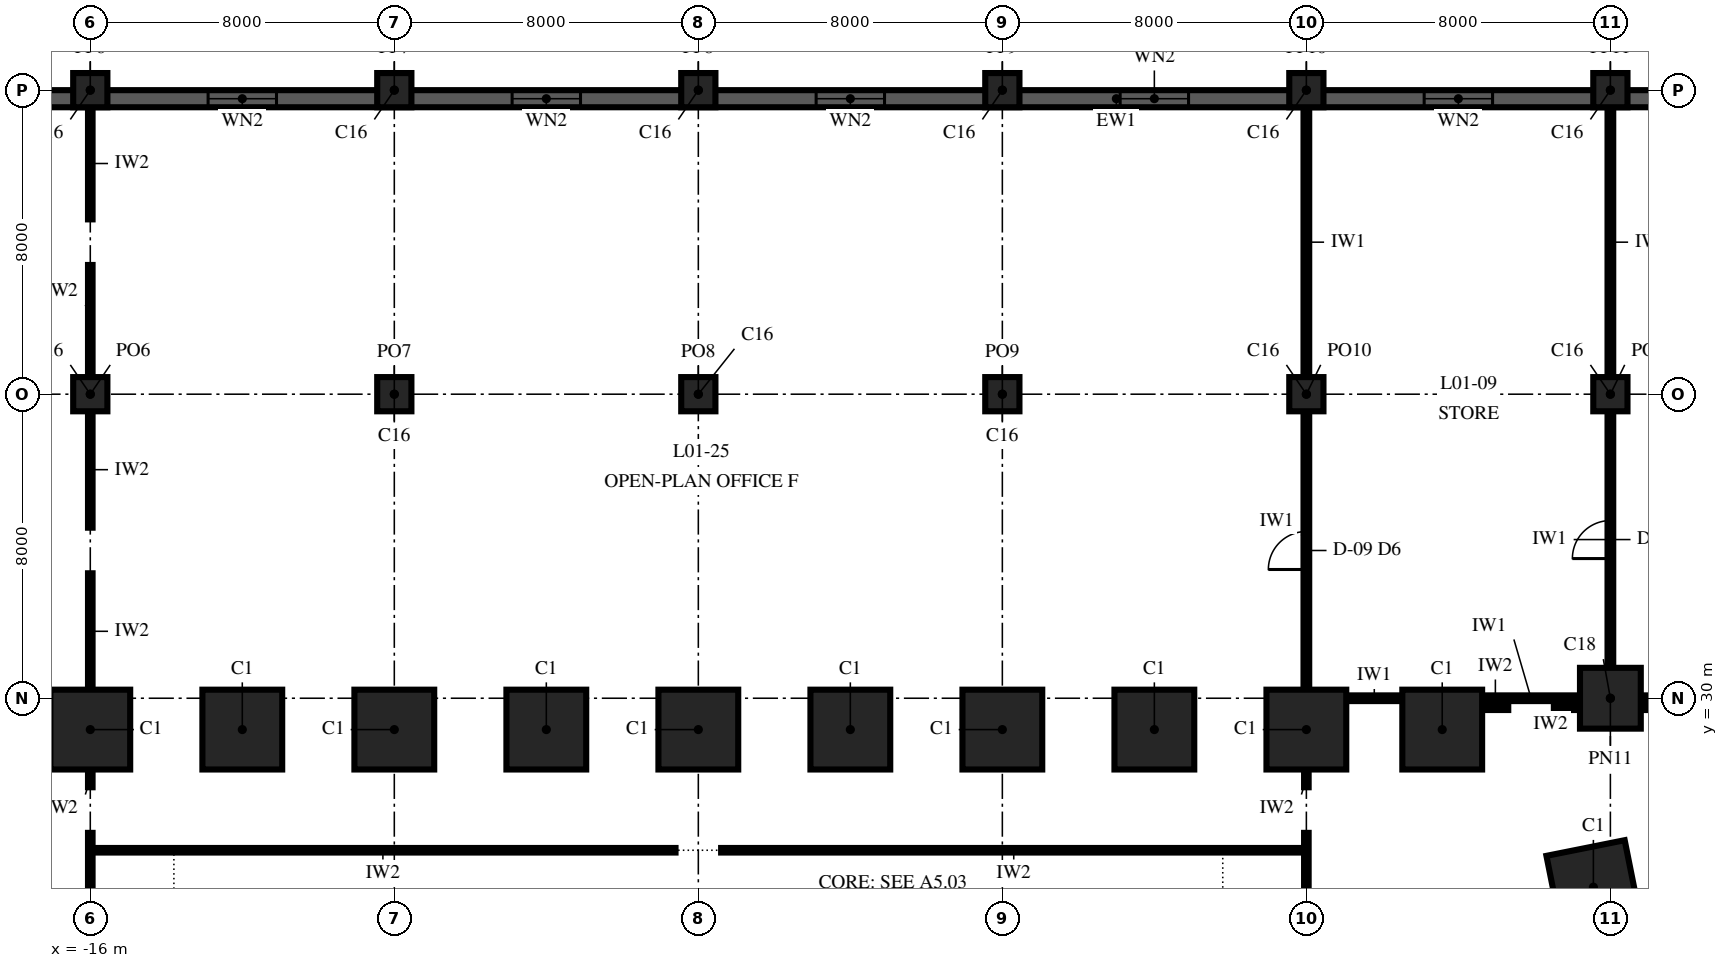
"""IFC4 building model, lengths in metres.
Left out: names, types, materials, properties, quantities, classifications, styles, units other than length and angle.
Written with IfcOpenShell. Run it as: python <this file> out.ifc"""

import sys

from ifc_helpers import new_model, si_unit, direction, frame, frame_2d, origin, origin_2d, place, context, subcontext, project, spatial, rectangle, extrude, element, fill, save


model = new_model("IFC4")
c1 = context("Model", 3, precision=1e-05, world=origin(), true_north=direction((0.0, 1.0)))
c2 = subcontext(c1, "Body", "Model", "MODEL_VIEW")
j1 = project(units=[si_unit("LENGTHUNIT", "METRE"), si_unit("PLANEANGLEUNIT", "RADIAN")], contexts=[c1])
p1 = place(None, origin())
s1 = spatial("IfcSite", under=j1, at=p1, CompositionType="ELEMENT")
p2 = place(p1, origin())
s2 = spatial("IfcBuilding", under=s1, at=p2, CompositionType="ELEMENT")
p3 = place(p2, frame((0.0, 0.0, 6.0)))
s3 = spatial("IfcBuildingStorey", under=s2, at=p3, CompositionType="ELEMENT", Elevation=6.0)
for number, where, z_axis, x_axis in (
    (1, (23.553, 25.029, 0.0), (0.0, 0.0, 1.0), (-0.196, 0.981, 0.0)),
    (2, (19.575, 29.175, 0.0), (0.0, 0.0, 1.0), (-1.0, 0.0, 0.0)),
    (3, (16.0, 29.175, 0.0), (0.0, 0.0, 1.0), (-1.0, 0.0, 0.0)),
    (4, (12.0, 29.175, 0.0), (0.0, 0.0, 1.0), (-1.0, 0.0, 0.0)),
    (5, (8.0, 29.175, 0.0), (0.0, 0.0, 1.0), (-1.0, 0.0, 0.0)),
    (6, (4.0, 29.175, 0.0), (0.0, 0.0, 1.0), (-1.0, 0.0, 0.0)),
    (7, (0.0, 29.175, 0.0), (0.0, 0.0, 1.0), (-1.0, 0.0, 0.0)),
    (8, (-4.0, 29.175, 0.0), (0.0, 0.0, 1.0), (-1.0, 0.0, 0.0)),
    (9, (-8.0, 29.175, 0.0), (0.0, 0.0, 1.0), (-1.0, 0.0, 0.0)),
    (10, (-12.0, 29.175, 0.0), (0.0, 0.0, 1.0), (-1.0, 0.0, 0.0)),
    (11, (-16.0, 29.175, 0.0), (0.0, 0.0, 1.0), (-1.0, 0.0, 0.0)),
):
    element("IfcColumn", number, at=place(p3, frame(where, z_axis=z_axis, x_axis=x_axis)), inside=s3, PredefinedType="COLUMN", context=c2, shape_type="SweptSolid", body=[
        extrude(rectangle(XDim=2.1, YDim=2.1, at=origin_2d()), origin(), (0.0, 0.0, 1.0), 6.0),
    ])
for number, where, z_axis, x_axis in (
    (12, (-16.0, 38.0, 0.0), (0.0, 0.0, 1.0), (1.0, 0.0, 0.0)),
    (13, (-16.0, 46.0, 0.0), (0.0, 0.0, 1.0), (1.0, 0.0, 0.0)),
    (14, (-8.0, 38.0, 0.0), (0.0, 0.0, 1.0), (1.0, 0.0, 0.0)),
    (15, (-8.0, 46.0, 0.0), (0.0, 0.0, 1.0), (1.0, 0.0, 0.0)),
    (16, (0.0, 38.0, 0.0), (0.0, 0.0, 1.0), (1.0, 0.0, 0.0)),
    (17, (0.0, 46.0, 0.0), (0.0, 0.0, 1.0), (1.0, 0.0, 0.0)),
    (18, (8.0, 38.0, 0.0), (0.0, 0.0, 1.0), (1.0, 0.0, 0.0)),
    (19, (8.0, 46.0, 0.0), (0.0, 0.0, 1.0), (1.0, 0.0, 0.0)),
    (20, (16.0, 38.0, 0.0), (0.0, 0.0, 1.0), (1.0, 0.0, 0.0)),
    (21, (16.0, 46.0, 0.0), (0.0, 0.0, 1.0), (1.0, 0.0, 0.0)),
):
    element("IfcColumn", number, at=place(p3, frame(where, z_axis=z_axis, x_axis=x_axis)), inside=s3, PredefinedType="COLUMN", context=c2, shape_type="SweptSolid", body=[
        extrude(rectangle(XDim=0.9, YDim=0.9, at=origin_2d()), origin(), (0.0, 0.0, 1.0), 6.0),
    ])
p4 = place(p3, frame((24.0, 30.0, 0.0), z_axis=(0.0, 0.0, 1.0), x_axis=(1.0, 0.0, 0.0)))
e22 = element("IfcColumn", 22, at=p4, inside=s3, PredefinedType="COLUMN", context=c2, shape_type="SweptSolid", body=[
    extrude(rectangle(XDim=1.6, YDim=1.6, at=origin_2d()), origin(), (0.0, 0.0, 1.0), 6.0),
])
for number, where, z_axis, x_axis in (
    (23, (24.0, 38.0, 0.0), (0.0, 0.0, 1.0), (1.0, 0.0, 0.0)),
    (24, (24.0, 46.0, 0.0), (0.0, 0.0, 1.0), (1.0, 0.0, 0.0)),
):
    element("IfcColumn", number, at=place(p3, frame(where, z_axis=z_axis, x_axis=x_axis)), inside=s3, PredefinedType="COLUMN", context=c2, shape_type="SweptSolid", body=[
        extrude(rectangle(XDim=0.9, YDim=0.9, at=origin_2d()), origin(), (0.0, 0.0, 1.0), 6.0),
    ])
p5 = place(p3, frame((56.0, 45.775, 0.0), z_axis=(0.0, 0.0, 1.0), x_axis=(-1.0, 0.0, 0.0)))
e25 = element("IfcWall", 25, at=p5, inside=s3, PredefinedType="SOLIDWALL", context=c2, shape_type="SweptSolid", body=[
    extrude(rectangle(XDim=90.0, YDim=0.45, at=frame_2d((45.0, 0.0))), origin(), (0.0, 0.0, 1.0), 6.0),
])
p6 = place(p5, frame((3.1, 0.0, 1.0)))
e26 = element("IfcOpeningElement", 26, at=p6, cuts=e25, PredefinedType="OPENING", context=c2, shape_type="SweptSolid", body=[
    extrude(rectangle(XDim=1.8, YDim=3.0, at=frame_2d((0.9, 1.5))), frame((0.0, 0.24, 0.0), z_axis=(0.0, -1.0, 0.0), x_axis=(1.0, 0.0, 0.0)), (0.0, 0.0, 1.0), 0.48),
])
p7 = place(p5, frame((11.1, 0.0, 1.0)))
e27 = element("IfcOpeningElement", 27, at=p7, cuts=e25, PredefinedType="OPENING", context=c2, shape_type="SweptSolid", body=[
    extrude(rectangle(XDim=1.8, YDim=3.0, at=frame_2d((0.9, 1.5))), frame((0.0, 0.24, 0.0), z_axis=(0.0, -1.0, 0.0), x_axis=(1.0, 0.0, 0.0)), (0.0, 0.0, 1.0), 0.48),
])
p8 = place(p5, frame((19.1, 0.0, 1.0)))
e28 = element("IfcOpeningElement", 28, at=p8, cuts=e25, PredefinedType="OPENING", context=c2, shape_type="SweptSolid", body=[
    extrude(rectangle(XDim=1.8, YDim=3.0, at=frame_2d((0.9, 1.5))), frame((0.0, 0.24, 0.0), z_axis=(0.0, -1.0, 0.0), x_axis=(1.0, 0.0, 0.0)), (0.0, 0.0, 1.0), 0.48),
])
p9 = place(p5, frame((27.1, 0.0, 1.0)))
e29 = element("IfcOpeningElement", 29, at=p9, cuts=e25, PredefinedType="OPENING", context=c2, shape_type="SweptSolid", body=[
    extrude(rectangle(XDim=1.8, YDim=3.0, at=frame_2d((0.9, 1.5))), frame((0.0, 0.24, 0.0), z_axis=(0.0, -1.0, 0.0), x_axis=(1.0, 0.0, 0.0)), (0.0, 0.0, 1.0), 0.48),
])
p10 = place(p5, frame((35.1, 0.0, 1.0)))
e30 = element("IfcOpeningElement", 30, at=p10, cuts=e25, PredefinedType="OPENING", context=c2, shape_type="SweptSolid", body=[
    extrude(rectangle(XDim=1.8, YDim=3.0, at=frame_2d((0.9, 1.5))), frame((0.0, 0.24, 0.0), z_axis=(0.0, -1.0, 0.0), x_axis=(1.0, 0.0, 0.0)), (0.0, 0.0, 1.0), 0.48),
])
p11 = place(p5, frame((43.1, 0.0, 1.0)))
e31 = element("IfcOpeningElement", 31, at=p11, cuts=e25, PredefinedType="OPENING", context=c2, shape_type="SweptSolid", body=[
    extrude(rectangle(XDim=1.8, YDim=3.0, at=frame_2d((0.9, 1.5))), frame((0.0, 0.24, 0.0), z_axis=(0.0, -1.0, 0.0), x_axis=(1.0, 0.0, 0.0)), (0.0, 0.0, 1.0), 0.48),
])
p12 = place(p5, frame((51.1, 0.0, 1.0)))
e32 = element("IfcOpeningElement", 32, at=p12, cuts=e25, PredefinedType="OPENING", context=c2, shape_type="SweptSolid", body=[
    extrude(rectangle(XDim=1.8, YDim=3.0, at=frame_2d((0.9, 1.5))), frame((0.0, 0.24, 0.0), z_axis=(0.0, -1.0, 0.0), x_axis=(1.0, 0.0, 0.0)), (0.0, 0.0, 1.0), 0.48),
])
p13 = place(p5, frame((59.1, 0.0, 1.0)))
e33 = element("IfcOpeningElement", 33, at=p13, cuts=e25, PredefinedType="OPENING", context=c2, shape_type="SweptSolid", body=[
    extrude(rectangle(XDim=1.8, YDim=3.0, at=frame_2d((0.9, 1.5))), frame((0.0, 0.24, 0.0), z_axis=(0.0, -1.0, 0.0), x_axis=(1.0, 0.0, 0.0)), (0.0, 0.0, 1.0), 0.48),
])
p14 = place(p5, frame((67.1, 0.0, 1.0)))
e34 = element("IfcOpeningElement", 34, at=p14, cuts=e25, PredefinedType="OPENING", context=c2, shape_type="SweptSolid", body=[
    extrude(rectangle(XDim=1.8, YDim=3.0, at=frame_2d((0.9, 1.5))), frame((0.0, 0.24, 0.0), z_axis=(0.0, -1.0, 0.0), x_axis=(1.0, 0.0, 0.0)), (0.0, 0.0, 1.0), 0.48),
])
p15 = place(p5, frame((75.1, 0.0, 1.0)))
e35 = element("IfcOpeningElement", 35, at=p15, cuts=e25, PredefinedType="OPENING", context=c2, shape_type="SweptSolid", body=[
    extrude(rectangle(XDim=1.8, YDim=3.0, at=frame_2d((0.9, 1.5))), frame((0.0, 0.24, 0.0), z_axis=(0.0, -1.0, 0.0), x_axis=(1.0, 0.0, 0.0)), (0.0, 0.0, 1.0), 0.48),
])
p16 = place(p5, frame((83.1, 0.0, 1.0)))
e36 = element("IfcOpeningElement", 36, at=p16, cuts=e25, PredefinedType="OPENING", context=c2, shape_type="SweptSolid", body=[
    extrude(rectangle(XDim=1.8, YDim=3.0, at=frame_2d((0.9, 1.5))), frame((0.0, 0.24, 0.0), z_axis=(0.0, -1.0, 0.0), x_axis=(1.0, 0.0, 0.0)), (0.0, 0.0, 1.0), 0.48),
])
p17 = place(p3, frame((-16.0, 22.46, 0.0), z_axis=(0.0, 0.0, 1.0), x_axis=(0.0, 1.0, 0.0)))
e37 = element("IfcWall", 37, at=p17, inside=s3, PredefinedType="PARTITIONING", context=c2, shape_type="SweptSolid", body=[
    extrude(rectangle(XDim=3.998, YDim=0.12, at=frame_2d((1.999, 0.0))), origin(), (0.0, 0.0, 1.0), 5.7),
])
p18 = place(p3, frame((-16.0, 27.657, 0.0), z_axis=(0.0, 0.0, 1.0), x_axis=(0.0, 1.0, 0.0)))
e38 = element("IfcWall", 38, at=p18, inside=s3, PredefinedType="PARTITIONING", context=c2, shape_type="SweptSolid", body=[
    extrude(rectangle(XDim=0.458, YDim=0.12, at=frame_2d((0.229, 0.0))), origin(), (0.0, 0.0, 1.0), 5.7),
])
for number, where, z_axis, x_axis in (
    (39, (-16.0, 30.235, 0.0), (0.0, 0.0, 1.0), (0.0, 1.0, 0.0)),
    (40, (-16.0, 34.488, 0.0), (0.0, 0.0, 1.0), (0.0, 1.0, 0.0)),
):
    element("IfcWall", number, at=place(p3, frame(where, z_axis=z_axis, x_axis=x_axis)), inside=s3, PredefinedType="PARTITIONING", context=c2, shape_type="SweptSolid", body=[
        extrude(rectangle(XDim=3.052, YDim=0.12, at=frame_2d((1.526, 0.0))), origin(), (0.0, 0.0, 1.0), 5.7),
    ])
for number, where, z_axis, x_axis in (
    (41, (-16.0, 38.46, 0.0), (0.0, 0.0, 1.0), (0.0, 1.0, 0.0)),
    (42, (-16.0, 42.6, 0.0), (0.0, 0.0, 1.0), (0.0, 1.0, 0.0)),
):
    element("IfcWall", number, at=place(p3, frame(where, z_axis=z_axis, x_axis=x_axis)), inside=s3, PredefinedType="PARTITIONING", context=c2, shape_type="SweptSolid", body=[
        extrude(rectangle(XDim=2.94, YDim=0.12, at=frame_2d((1.47, 0.0))), origin(), (0.0, 0.0, 1.0), 5.05),
    ])
p19 = place(p3, frame((16.0, 22.46, 0.0), z_axis=(0.0, 0.0, 1.0), x_axis=(0.0, 1.0, 0.0)))
e43 = element("IfcWall", 43, at=p19, inside=s3, PredefinedType="PARTITIONING", context=c2, shape_type="SweptSolid", body=[
    extrude(rectangle(XDim=3.998, YDim=0.12, at=frame_2d((1.999, 0.0))), origin(), (0.0, 0.0, 1.0), 5.7),
])
p20 = place(p3, frame((16.0, 27.657, 0.0), z_axis=(0.0, 0.0, 1.0), x_axis=(0.0, 1.0, 0.0)))
e44 = element("IfcWall", 44, at=p20, inside=s3, PredefinedType="PARTITIONING", context=c2, shape_type="SweptSolid", body=[
    extrude(rectangle(XDim=0.458, YDim=0.12, at=frame_2d((0.229, 0.0))), origin(), (0.0, 0.0, 1.0), 5.7),
])
p21 = place(p3, frame((16.0, 30.235, 0.0), z_axis=(0.0, 0.0, 1.0), x_axis=(0.0, 1.0, 0.0)))
e45 = element("IfcWall", 45, at=p21, inside=s3, PredefinedType="PARTITIONING", context=c2, shape_type="SweptSolid", body=[
    extrude(rectangle(XDim=7.305, YDim=0.15, at=frame_2d((3.652, 0.0))), origin(), (0.0, 0.0, 1.0), 5.7),
])
p22 = place(p21, frame((3.153, 0.0, 0.0)))
e46 = element("IfcOpeningElement", 46, at=p22, cuts=e45, PredefinedType="OPENING", context=c2, shape_type="SweptSolid", body=[
    extrude(rectangle(XDim=1.0, YDim=2.1, at=frame_2d((0.5, 1.05))), frame((0.0, 0.09, 0.0), z_axis=(0.0, -1.0, 0.0), x_axis=(1.0, 0.0, 0.0)), (0.0, 0.0, 1.0), 0.18),
])
p23 = place(p3, frame((16.0, 38.46, 0.0), z_axis=(0.0, 0.0, 1.0), x_axis=(0.0, 1.0, 0.0)))
e47 = element("IfcWall", 47, at=p23, inside=s3, PredefinedType="PARTITIONING", context=c2, shape_type="SweptSolid", body=[
    extrude(rectangle(XDim=7.08, YDim=0.15, at=frame_2d((3.54, 0.0))), origin(), (0.0, 0.0, 1.0), 5.05),
])
p24 = place(p3, frame((24.0, 30.81, 0.0), z_axis=(0.0, 0.0, 1.0), x_axis=(0.0, 1.0, 0.0)))
e48 = element("IfcWall", 48, at=p24, inside=s3, PredefinedType="PARTITIONING", context=c2, shape_type="SweptSolid", body=[
    extrude(rectangle(XDim=6.73, YDim=0.15, at=frame_2d((3.365, 0.0))), origin(), (0.0, 0.0, 1.0), 5.05),
])
p25 = place(p24, frame((2.865, 0.0, 0.0)))
e49 = element("IfcOpeningElement", 49, at=p25, cuts=e48, PredefinedType="OPENING", context=c2, shape_type="SweptSolid", body=[
    extrude(rectangle(XDim=1.0, YDim=2.1, at=frame_2d((0.5, 1.05))), frame((0.0, 0.09, 0.0), z_axis=(0.0, -1.0, 0.0), x_axis=(1.0, 0.0, 0.0)), (0.0, 0.0, 1.0), 0.18),
])
p26 = place(p3, frame((24.0, 38.46, 0.0), z_axis=(0.0, 0.0, 1.0), x_axis=(0.0, 1.0, 0.0)))
e50 = element("IfcWall", 50, at=p26, inside=s3, PredefinedType="PARTITIONING", context=c2, shape_type="SweptSolid", body=[
    extrude(rectangle(XDim=7.08, YDim=0.15, at=frame_2d((3.54, 0.0))), origin(), (0.0, 0.0, 1.0), 5.05),
])
for number, where, z_axis, x_axis in (
    (51, (-16.0, 26.0, 0.0), (0.0, 0.0, 1.0), (1.0, 0.0, 0.0)),
    (52, (0.6, 26.0, 0.0), (0.0, 0.0, 1.0), (1.0, 0.0, 0.0)),
):
    element("IfcWall", number, at=place(p3, frame(where, z_axis=z_axis, x_axis=x_axis)), inside=s3, PredefinedType="PARTITIONING", context=c2, shape_type="SweptSolid", body=[
        extrude(rectangle(XDim=15.4, YDim=0.12, at=frame_2d((7.7, 0.0))), origin(), (0.0, 0.0, 1.0), 5.7),
    ])
for number, where, z_axis, x_axis in (
    (53, (20.635, 29.75, 0.0), (0.0, 0.0, 1.0), (1.0, 0.0, 0.0)),
    (54, (22.512, 29.75, 0.0), (0.0, 0.0, 1.0), (1.0, 0.0, 0.0)),
):
    element("IfcWall", number, at=place(p3, frame(where, z_axis=z_axis, x_axis=x_axis)), inside=s3, PredefinedType="PARTITIONING", context=c2, shape_type="SweptSolid", body=[
        extrude(rectangle(XDim=0.677, YDim=0.12, at=frame_2d((0.339, 0.0))), origin(), (0.0, 0.0, 1.0), 5.7),
    ])
p27 = place(p3, frame((24.81, 29.75, 0.0), z_axis=(0.0, 0.0, 1.0), x_axis=(1.0, 0.0, 0.0)))
e55 = element("IfcWall", 55, at=p27, inside=s3, PredefinedType="PARTITIONING", context=c2, shape_type="SweptSolid", body=[
    extrude(rectangle(XDim=2.765, YDim=0.12, at=frame_2d((1.382, 0.0))), origin(), (0.0, 0.0, 1.0), 5.05),
])
p28 = place(p3, frame((17.06, 30.0, 0.0), z_axis=(0.0, 0.0, 1.0), x_axis=(1.0, 0.0, 0.0)))
e56 = element("IfcWall", 56, at=p28, inside=s3, PredefinedType="PARTITIONING", context=c2, shape_type="SweptSolid", body=[
    extrude(rectangle(XDim=1.455, YDim=0.15, at=frame_2d((0.728, 0.0))), origin(), (0.0, 0.0, 1.0), 5.7),
])
p29 = place(p3, frame((20.635, 30.0, 0.0), z_axis=(0.0, 0.0, 1.0), x_axis=(1.0, 0.0, 0.0)))
e57 = element("IfcWall", 57, at=p29, inside=s3, PredefinedType="PARTITIONING", context=c2, shape_type="SweptSolid", body=[
    extrude(rectangle(XDim=2.555, YDim=0.15, at=frame_2d((1.277, 0.0))), origin(), (0.0, 0.0, 1.0), 5.7),
])
p30 = place(p3, frame((24.81, 30.0, 0.0), z_axis=(0.0, 0.0, 1.0), x_axis=(1.0, 0.0, 0.0)))
e58 = element("IfcWall", 58, at=p30, inside=s3, PredefinedType="PARTITIONING", context=c2, shape_type="SweptSolid", body=[
    extrude(rectangle(XDim=6.73, YDim=0.15, at=frame_2d((3.365, 0.0))), origin(), (0.0, 0.0, 1.0), 5.05),
])
p31 = place(p10, origin())
e59 = element("IfcWindow", 59, at=p31, inside=s3, PartitioningType="SINGLE_PANEL", PredefinedType="WINDOW", context=c2, shape_type="SweptSolid", body=[
    extrude(rectangle(XDim=1.8, YDim=3.0, at=frame_2d((0.9, 1.5))), frame((0.0, 0.03, 0.0), z_axis=(0.0, -1.0, 0.0), x_axis=(1.0, 0.0, 0.0)), (0.0, 0.0, 1.0), 0.06),
])
fill(e30, e59)
p32 = place(p11, origin())
e60 = element("IfcWindow", 60, at=p32, inside=s3, PartitioningType="SINGLE_PANEL", PredefinedType="WINDOW", context=c2, shape_type="SweptSolid", body=[
    extrude(rectangle(XDim=1.8, YDim=3.0, at=frame_2d((0.9, 1.5))), frame((0.0, 0.03, 0.0), z_axis=(0.0, -1.0, 0.0), x_axis=(1.0, 0.0, 0.0)), (0.0, 0.0, 1.0), 0.06),
])
fill(e31, e60)
p33 = place(p12, origin())
e61 = element("IfcWindow", 61, at=p33, inside=s3, PartitioningType="SINGLE_PANEL", PredefinedType="WINDOW", context=c2, shape_type="SweptSolid", body=[
    extrude(rectangle(XDim=1.8, YDim=3.0, at=frame_2d((0.9, 1.5))), frame((0.0, 0.03, 0.0), z_axis=(0.0, -1.0, 0.0), x_axis=(1.0, 0.0, 0.0)), (0.0, 0.0, 1.0), 0.06),
])
fill(e32, e61)
p34 = place(p13, origin())
e62 = element("IfcWindow", 62, at=p34, inside=s3, PartitioningType="SINGLE_PANEL", PredefinedType="WINDOW", context=c2, shape_type="SweptSolid", body=[
    extrude(rectangle(XDim=1.8, YDim=3.0, at=frame_2d((0.9, 1.5))), frame((0.0, 0.03, 0.0), z_axis=(0.0, -1.0, 0.0), x_axis=(1.0, 0.0, 0.0)), (0.0, 0.0, 1.0), 0.06),
])
fill(e33, e62)
p35 = place(p14, origin())
e63 = element("IfcWindow", 63, at=p35, inside=s3, PartitioningType="SINGLE_PANEL", PredefinedType="WINDOW", context=c2, shape_type="SweptSolid", body=[
    extrude(rectangle(XDim=1.8, YDim=3.0, at=frame_2d((0.9, 1.5))), frame((0.0, 0.03, 0.0), z_axis=(0.0, -1.0, 0.0), x_axis=(1.0, 0.0, 0.0)), (0.0, 0.0, 1.0), 0.06),
])
fill(e34, e63)
p36 = place(p22, origin())
e64 = element("IfcDoor", 64, at=p36, inside=s3, OperationType="SINGLE_SWING_LEFT", PredefinedType="DOOR", context=c2, shape_type="SweptSolid", body=[
    extrude(rectangle(XDim=1.0, YDim=2.1, at=frame_2d((0.5, 1.05))), frame((0.0, 0.075, 0.0), z_axis=(0.0, -1.0, 0.0), x_axis=(1.0, 0.0, 0.0)), (0.0, 0.0, 1.0), 0.149),
])
fill(e46, e64)
p37 = place(p25, origin())
e65 = element("IfcDoor", 65, at=p37, inside=s3, OperationType="SINGLE_SWING_LEFT", PredefinedType="DOOR", context=c2, shape_type="SweptSolid", body=[
    extrude(rectangle(XDim=1.0, YDim=2.1, at=frame_2d((0.5, 1.05))), frame((0.0, 0.075, 0.0), z_axis=(0.0, -1.0, 0.0), x_axis=(1.0, 0.0, 0.0)), (0.0, 0.0, 1.0), 0.149),
])
fill(e49, e65)
save(model, sys.argv[1])
